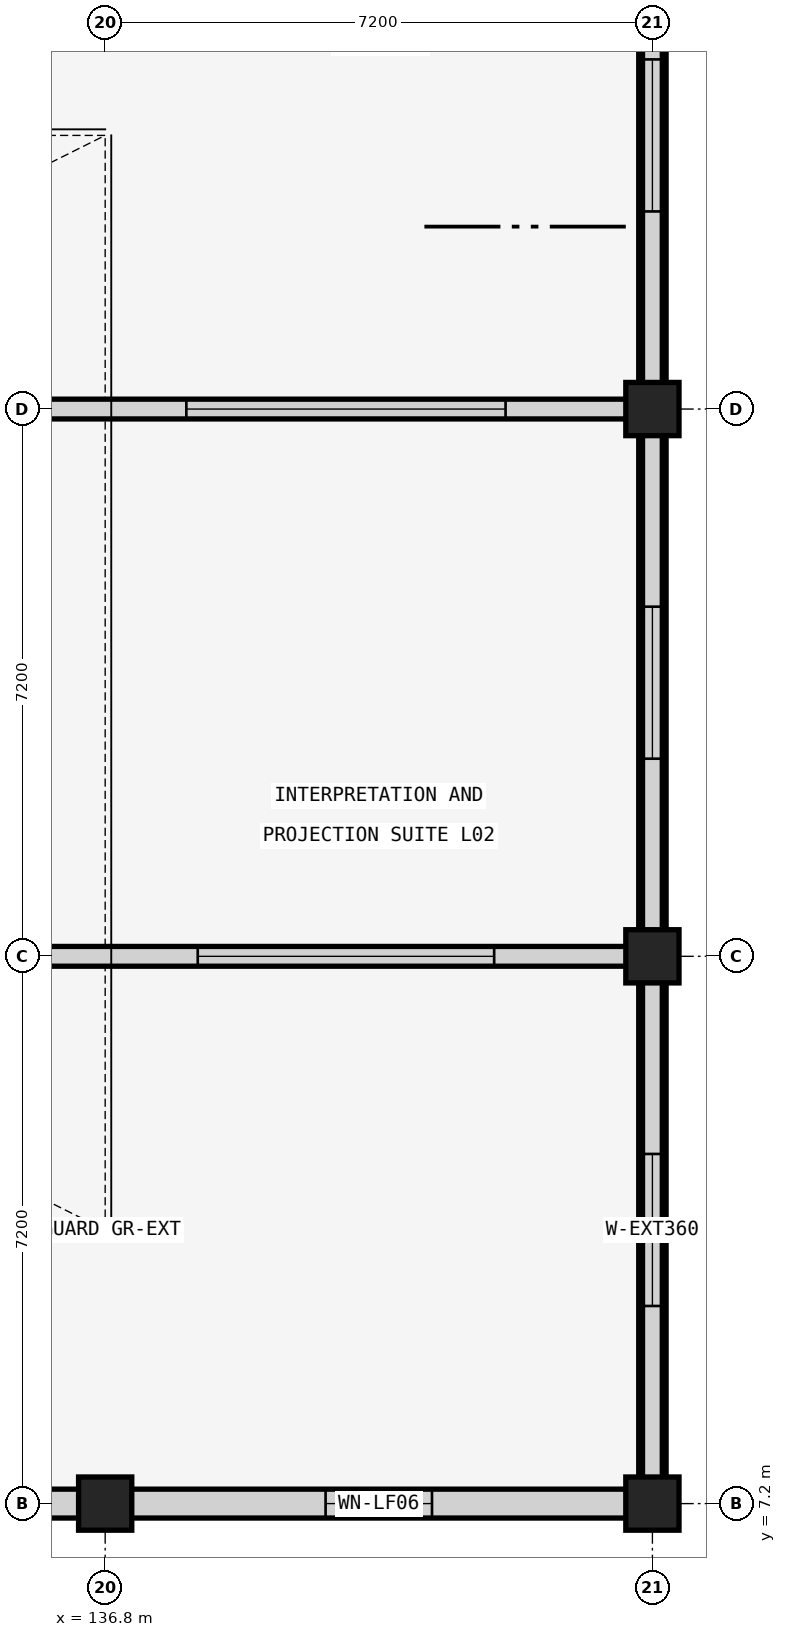
"""IFC4 building model, lengths in metres.
Left out: names, types, materials, properties, quantities, classifications, styles, units other than length and angle.
Written with IfcOpenShell. Run it as: python <this file> out.ifc"""

import sys

from ifc_helpers import new_model, si_unit, direction, frame, frame_2d, origin, origin_2d, place, context, subcontext, project, spatial, polyline, rectangle, outline, extrude, element, fill, save


model = new_model("IFC4")
c1 = context("Model", 3, precision=1e-05, world=origin(), true_north=direction((0.0, 1.0)))
c2 = subcontext(c1, "Body", "Model", "MODEL_VIEW")
j1 = project(units=[si_unit("LENGTHUNIT", "METRE"), si_unit("PLANEANGLEUNIT", "RADIAN")], contexts=[c1])
p1 = place(None, origin())
s1 = spatial("IfcSite", under=j1, at=p1, CompositionType="ELEMENT")
p2 = place(p1, origin())
s2 = spatial("IfcBuilding", under=s1, at=p2, CompositionType="ELEMENT")
p3 = place(p2, frame((0.0, 0.0, 8.96)))
s3 = spatial("IfcBuildingStorey", under=s2, at=p3, CompositionType="ELEMENT", Elevation=8.96)
for number, where, z_axis, x_axis in (
    (1, (136.8, 7.2, 0.0), (0.0, 0.0, 1.0), (1.0, 0.0, 0.0)),
    (2, (144.0, 7.2, 0.0), (0.0, 0.0, 1.0), (1.0, 0.0, 0.0)),
    (3, (144.0, 14.4, 0.0), (0.0, 0.0, 1.0), (1.0, 0.0, 0.0)),
    (4, (144.0, 21.6, 0.0), (0.0, 0.0, 1.0), (1.0, 0.0, 0.0)),
):
    element("IfcColumn", number, at=place(p3, frame(where, z_axis=z_axis, x_axis=x_axis)), inside=s3, PredefinedType="COLUMN", context=c2, shape_type="SweptSolid", body=[
        extrude(rectangle(XDim=0.7, YDim=0.7, at=origin_2d()), origin(), (0.0, 0.0, 1.0), 4.16),
    ])
p4 = place(p3, frame((129.94, 7.2, 0.0), z_axis=(0.0, 0.0, 1.0), x_axis=(1.0, 0.0, 0.0)))
e5 = element("IfcWall", 5, at=p4, inside=s3, PredefinedType="SOLIDWALL", context=c2, shape_type="SweptSolid", body=[
    extrude(rectangle(XDim=6.52, YDim=0.38, at=frame_2d((3.26, 0.0))), origin(), (0.0, 0.0, 1.0), 3.61),
])
p5 = place(p4, frame((1.66, 0.0, 1.0)))
e6 = element("IfcOpeningElement", 6, at=p5, cuts=e5, PredefinedType="OPENING", context=c2, shape_type="SweptSolid", body=[
    extrude(rectangle(XDim=3.2, YDim=2.4, at=frame_2d((1.6, 1.2))), frame((0.0, 0.2, 0.0), z_axis=(0.0, -1.0, 0.0), x_axis=(1.0, 0.0, 0.0)), (0.0, 0.0, 1.0), 0.4),
])
p6 = place(p3, frame((137.14, 7.2, 0.0), z_axis=(0.0, 0.0, 1.0), x_axis=(1.0, 0.0, 0.0)))
e7 = element("IfcWall", 7, at=p6, inside=s3, PredefinedType="SOLIDWALL", context=c2, shape_type="SweptSolid", body=[
    extrude(rectangle(XDim=6.52, YDim=0.38, at=frame_2d((3.26, 0.0))), origin(), (0.0, 0.0, 1.0), 3.61),
])
p7 = place(p6, frame((2.56, 0.0, 1.0)))
e8 = element("IfcOpeningElement", 8, at=p7, cuts=e7, PredefinedType="OPENING", context=c2, shape_type="SweptSolid", body=[
    extrude(rectangle(XDim=1.4, YDim=2.2, at=frame_2d((0.7, 1.1))), frame((0.0, 0.2, 0.0), z_axis=(0.0, -1.0, 0.0), x_axis=(1.0, 0.0, 0.0)), (0.0, 0.0, 1.0), 0.4),
])
p8 = place(p3, frame((144.0, 7.54, 0.0), z_axis=(0.0, 0.0, 1.0), x_axis=(0.0, 1.0, 0.0)))
e9 = element("IfcWall", 9, at=p8, inside=s3, PredefinedType="SOLIDWALL", context=c2, shape_type="SweptSolid", body=[
    extrude(rectangle(XDim=6.52, YDim=0.36, at=frame_2d((3.26, 0.0))), origin(), (0.0, 0.0, 1.0), 3.16),
])
p9 = place(p8, frame((2.26, 0.0, 0.6)))
e10 = element("IfcOpeningElement", 10, at=p9, cuts=e9, PredefinedType="OPENING", context=c2, shape_type="SweptSolid", body=[
    extrude(rectangle(XDim=2.0, YDim=2.4, at=frame_2d((1.0, 1.2))), frame((0.0, 0.19, 0.0), z_axis=(0.0, -1.0, 0.0), x_axis=(1.0, 0.0, 0.0)), (0.0, 0.0, 1.0), 0.38),
])
p10 = place(p3, frame((144.0, 14.74, 0.0), z_axis=(0.0, 0.0, 1.0), x_axis=(0.0, 1.0, 0.0)))
e11 = element("IfcWall", 11, at=p10, inside=s3, PredefinedType="SOLIDWALL", context=c2, shape_type="SweptSolid", body=[
    extrude(rectangle(XDim=6.52, YDim=0.36, at=frame_2d((3.26, 0.0))), origin(), (0.0, 0.0, 1.0), 3.16),
])
p11 = place(p10, frame((2.26, 0.0, 0.6)))
e12 = element("IfcOpeningElement", 12, at=p11, cuts=e11, PredefinedType="OPENING", context=c2, shape_type="SweptSolid", body=[
    extrude(rectangle(XDim=2.0, YDim=2.4, at=frame_2d((1.0, 1.2))), frame((0.0, 0.19, 0.0), z_axis=(0.0, -1.0, 0.0), x_axis=(1.0, 0.0, 0.0)), (0.0, 0.0, 1.0), 0.38),
])
p12 = place(p3, frame((144.0, 21.94, 0.0), z_axis=(0.0, 0.0, 1.0), x_axis=(0.0, 1.0, 0.0)))
e13 = element("IfcWall", 13, at=p12, inside=s3, PredefinedType="SOLIDWALL", context=c2, shape_type="SweptSolid", body=[
    extrude(rectangle(XDim=6.52, YDim=0.36, at=frame_2d((3.26, 0.0))), origin(), (0.0, 0.0, 1.0), 3.16),
])
p13 = place(p12, frame((2.26, 0.0, 0.6)))
e14 = element("IfcOpeningElement", 14, at=p13, cuts=e13, PredefinedType="OPENING", context=c2, shape_type="SweptSolid", body=[
    extrude(rectangle(XDim=2.0, YDim=2.4, at=frame_2d((1.0, 1.2))), frame((0.0, 0.19, 0.0), z_axis=(0.0, -1.0, 0.0), x_axis=(1.0, 0.0, 0.0)), (0.0, 0.0, 1.0), 0.38),
])
p14 = place(p3, frame((129.6, 14.4, 4.16), z_axis=(0.0, 0.0, 1.0), x_axis=(1.0, 0.0, 0.0)))
e15 = element("IfcWall", 15, at=p14, inside=s3, PredefinedType="SOLIDWALL", context=c2, shape_type="SweptSolid", body=[
    extrude(rectangle(XDim=14.4, YDim=0.26, at=frame_2d((7.2, 0.0))), origin(), (0.0, 0.0, 1.0), 3.95),
])
p15 = place(p14, frame((2.082, 0.0, 0.4)))
e16 = element("IfcOpeningElement", 16, at=p15, cuts=e15, PredefinedType="OPENING", context=c2, shape_type="SweptSolid", body=[
    extrude(rectangle(XDim=3.9, YDim=2.4, at=frame_2d((1.95, 1.2))), frame((0.0, 0.14, 0.0), z_axis=(0.0, -1.0, 0.0), x_axis=(1.0, 0.0, 0.0)), (0.0, 0.0, 1.0), 0.28),
])
p16 = place(p14, frame((8.418, 0.0, 0.4)))
e17 = element("IfcOpeningElement", 17, at=p16, cuts=e15, PredefinedType="OPENING", context=c2, shape_type="SweptSolid", body=[
    extrude(rectangle(XDim=3.9, YDim=2.4, at=frame_2d((1.95, 1.2))), frame((0.0, 0.14, 0.0), z_axis=(0.0, -1.0, 0.0), x_axis=(1.0, 0.0, 0.0)), (0.0, 0.0, 1.0), 0.28),
])
p17 = place(p3, frame((144.0, 7.2, 4.16), z_axis=(0.0, 0.0, 1.0), x_axis=(0.0, 1.0, 0.0)))
e18 = element("IfcWall", 18, at=p17, inside=s3, PredefinedType="SOLIDWALL", context=c2, shape_type="SweptSolid", body=[
    extrude(outline(polyline([(0.0, 0.0), (7.2, 0.0), (7.2, 0.12), (7.16, 4.2), (0.0, 0.12), (0.0, 0.0)])), frame((0.0, 0.13, 0.0), z_axis=(0.0, -1.0, 0.0), x_axis=(1.0, 0.0, 0.0)), (0.0, 0.0, 1.0), 0.26),
])
p18 = place(p3, frame((129.6, 21.6, 4.16), z_axis=(0.0, 0.0, 1.0), x_axis=(1.0, 0.0, 0.0)))
e19 = element("IfcWall", 19, at=p18, inside=s3, PredefinedType="SOLIDWALL", context=c2, shape_type="SweptSolid", body=[
    extrude(rectangle(XDim=14.4, YDim=0.26, at=frame_2d((7.2, 0.0))), origin(), (0.0, 0.0, 1.0), 3.95),
])
p19 = place(p18, frame((1.932, 0.0, 0.4)))
e20 = element("IfcOpeningElement", 20, at=p19, cuts=e19, PredefinedType="OPENING", context=c2, shape_type="SweptSolid", body=[
    extrude(rectangle(XDim=4.2, YDim=2.6, at=frame_2d((2.1, 1.3))), frame((0.0, 0.14, 0.0), z_axis=(0.0, -1.0, 0.0), x_axis=(1.0, 0.0, 0.0)), (0.0, 0.0, 1.0), 0.28),
])
p20 = place(p18, frame((8.268, 0.0, 0.4)))
e21 = element("IfcOpeningElement", 21, at=p20, cuts=e19, PredefinedType="OPENING", context=c2, shape_type="SweptSolid", body=[
    extrude(rectangle(XDim=4.2, YDim=2.6, at=frame_2d((2.1, 1.3))), frame((0.0, 0.14, 0.0), z_axis=(0.0, -1.0, 0.0), x_axis=(1.0, 0.0, 0.0)), (0.0, 0.0, 1.0), 0.28),
])
p21 = place(p3, frame((144.0, 14.4, 4.16), z_axis=(0.0, 0.0, 1.0), x_axis=(0.0, 1.0, 0.0)))
e22 = element("IfcWall", 22, at=p21, inside=s3, PredefinedType="SOLIDWALL", context=c2, shape_type="SweptSolid", body=[
    extrude(outline(polyline([(0.0, 0.0), (7.2, 0.0), (7.2, 0.12), (7.16, 4.2), (0.0, 0.12), (0.0, 0.0)])), frame((0.0, 0.13, 0.0), z_axis=(0.0, -1.0, 0.0), x_axis=(1.0, 0.0, 0.0)), (0.0, 0.0, 1.0), 0.26),
])
p22 = place(p3, frame((144.0, 21.6, 4.16), z_axis=(0.0, 0.0, 1.0), x_axis=(0.0, 1.0, 0.0)))
e23 = element("IfcWall", 23, at=p22, inside=s3, PredefinedType="SOLIDWALL", context=c2, shape_type="SweptSolid", body=[
    extrude(outline(polyline([(0.0, 0.0), (7.2, 0.0), (7.2, 0.12), (7.16, 4.2), (0.0, 0.12), (0.0, 0.0)])), frame((0.0, 0.13, 0.0), z_axis=(0.0, -1.0, 0.0), x_axis=(1.0, 0.0, 0.0)), (0.0, 0.0, 1.0), 0.26),
])
p23 = place(p7, origin())
e24 = element("IfcWindow", 24, at=p23, inside=s3, PartitioningType="SINGLE_PANEL", PredefinedType="WINDOW", context=c2, shape_type="SweptSolid", body=[
    extrude(rectangle(XDim=1.4, YDim=2.2, at=frame_2d((0.7, 1.1))), frame((0.0, 0.03, 0.0), z_axis=(0.0, -1.0, 0.0), x_axis=(1.0, 0.0, 0.0)), (0.0, 0.0, 1.0), 0.06),
])
fill(e8, e24)
p24 = place(p9, origin())
e25 = element("IfcWindow", 25, at=p24, inside=s3, PartitioningType="SINGLE_PANEL", PredefinedType="WINDOW", context=c2, shape_type="SweptSolid", body=[
    extrude(rectangle(XDim=2.0, YDim=2.4, at=frame_2d((1.0, 1.2))), frame((0.0, 0.03, 0.0), z_axis=(0.0, -1.0, 0.0), x_axis=(1.0, 0.0, 0.0)), (0.0, 0.0, 1.0), 0.06),
])
fill(e10, e25)
p25 = place(p11, origin())
e26 = element("IfcWindow", 26, at=p25, inside=s3, PartitioningType="SINGLE_PANEL", PredefinedType="WINDOW", context=c2, shape_type="SweptSolid", body=[
    extrude(rectangle(XDim=2.0, YDim=2.4, at=frame_2d((1.0, 1.2))), frame((0.0, 0.03, 0.0), z_axis=(0.0, -1.0, 0.0), x_axis=(1.0, 0.0, 0.0)), (0.0, 0.0, 1.0), 0.06),
])
fill(e12, e26)
p26 = place(p13, origin())
e27 = element("IfcWindow", 27, at=p26, inside=s3, PartitioningType="SINGLE_PANEL", PredefinedType="WINDOW", context=c2, shape_type="SweptSolid", body=[
    extrude(rectangle(XDim=2.0, YDim=2.4, at=frame_2d((1.0, 1.2))), frame((0.0, 0.03, 0.0), z_axis=(0.0, -1.0, 0.0), x_axis=(1.0, 0.0, 0.0)), (0.0, 0.0, 1.0), 0.06),
])
fill(e14, e27)
p27 = place(p16, origin())
e28 = element("IfcWindow", 28, at=p27, inside=s3, PartitioningType="SINGLE_PANEL", PredefinedType="SKYLIGHT", context=c2, shape_type="SweptSolid", body=[
    extrude(rectangle(XDim=3.9, YDim=2.4, at=frame_2d((1.95, 1.2))), frame((0.0, 0.03, 0.0), z_axis=(0.0, -1.0, 0.0), x_axis=(1.0, 0.0, 0.0)), (0.0, 0.0, 1.0), 0.06),
])
fill(e17, e28)
p28 = place(p20, origin())
e29 = element("IfcWindow", 29, at=p28, inside=s3, PartitioningType="SINGLE_PANEL", PredefinedType="SKYLIGHT", context=c2, shape_type="SweptSolid", body=[
    extrude(rectangle(XDim=4.2, YDim=2.6, at=frame_2d((2.1, 1.3))), frame((0.0, 0.03, 0.0), z_axis=(0.0, -1.0, 0.0), x_axis=(1.0, 0.0, 0.0)), (0.0, 0.0, 1.0), 0.06),
])
fill(e21, e29)
save(model, sys.argv[1])
